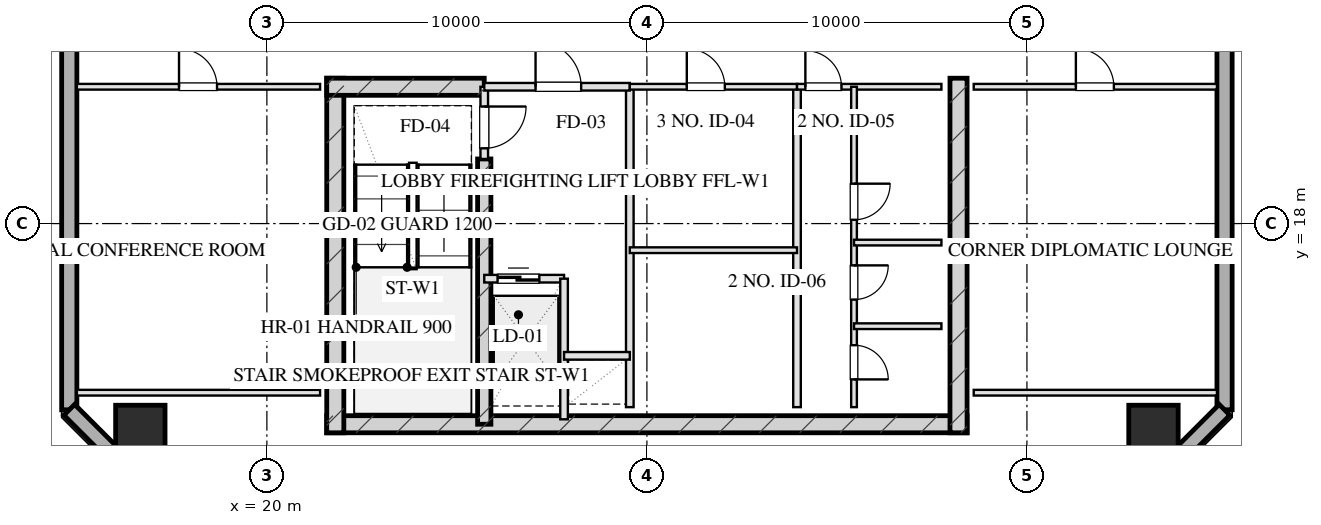
"""IFC4 building model, lengths in metres.
Left out: names, types, materials, properties, quantities, classifications, styles, units other than length and angle.
Written with IfcOpenShell. Run it as: python <this file> out.ifc"""

import sys

from ifc_helpers import new_model, si_unit, direction, frame, frame_2d, origin, origin_2d, place, context, subcontext, project, spatial, rectangle, hollow_rectangle, extrude, element, fill, save


model = new_model("IFC4")
c1 = context("Model", 3, precision=1e-05, world=origin(), true_north=direction((0.0, 1.0)))
c2 = subcontext(c1, "Body", "Model", "MODEL_VIEW")
j1 = project(units=[si_unit("LENGTHUNIT", "METRE"), si_unit("PLANEANGLEUNIT", "RADIAN")], contexts=[c1])
p1 = place(None, origin())
s1 = spatial("IfcSite", under=j1, at=p1, CompositionType="ELEMENT")
p2 = place(p1, origin())
s2 = spatial("IfcBuilding", under=s1, at=p2, CompositionType="ELEMENT")
p3 = place(p2, frame((0.0, 0.0, 234.4)))
s3 = spatial("IfcBuildingStorey", under=s2, at=p3, CompositionType="ELEMENT", Elevation=234.4)
p4 = place(p3, frame((21.575, 12.72, 0.0), z_axis=(0.0, 0.0, 1.0), x_axis=(1.0, 0.0, 0.0)))
e1 = element("IfcWall", 1, at=p4, inside=s3, PredefinedType="SHEAR", context=c2, shape_type="SweptSolid", body=[
    extrude(rectangle(XDim=16.85, YDim=0.45, at=frame_2d((8.425, 0.0))), origin(), (0.0, 0.0, 1.0), 3.2),
])
for number, where, z_axis, x_axis in (
    (2, (21.8, 21.825, 0.0), (0.0, 0.0, 1.0), (0.0, -1.0, 0.0)),
    (3, (38.2, 21.825, 0.0), (0.0, 0.0, 1.0), (0.0, -1.0, 0.0)),
):
    element("IfcWall", number, at=place(p3, frame(where, z_axis=z_axis, x_axis=x_axis)), inside=s3, PredefinedType="SHEAR", context=c2, shape_type="SweptSolid", body=[
        extrude(rectangle(XDim=9.33, YDim=0.45, at=frame_2d((4.665, 0.0))), origin(), (0.0, 0.0, 1.0), 3.2),
    ])
p5 = place(p3, frame((25.72, 19.7, 0.0), z_axis=(0.0, 0.0, 1.0), x_axis=(0.0, -1.0, 0.0)))
e4 = element("IfcWall", 4, at=p5, inside=s3, PredefinedType="SHEAR", context=c2, shape_type="SweptSolid", body=[
    extrude(rectangle(XDim=6.98, YDim=0.35, at=frame_2d((3.49, 0.0))), origin(), (0.0, 0.0, 1.0), 3.2),
])
p6 = place(p3, frame((21.575, 21.6, 0.0), z_axis=(0.0, 0.0, 1.0), x_axis=(1.0, 0.0, 0.0)))
e5 = element("IfcWall", 5, at=p6, inside=s3, PredefinedType="SHEAR", context=c2, shape_type="SweptSolid", body=[
    extrude(rectangle(XDim=4.145, YDim=0.45, at=frame_2d((2.073, 0.0))), origin(), (0.0, 0.0, 1.0), 3.2),
])
for number, where, z_axis, x_axis in (
    (6, (16.67, 12.57, 0.0), (0.0, 0.0, 1.0), (1.0, 0.0, 0.0)),
    (7, (43.33, 12.57, 0.0), (0.0, 0.0, 1.0), (1.0, 0.0, 0.0)),
):
    element("IfcColumn", number, at=place(p3, frame(where, z_axis=z_axis, x_axis=x_axis)), inside=s3, PredefinedType="COLUMN", context=c2, shape_type="SweptSolid", body=[
        extrude(hollow_rectangle(XDim=1.3, YDim=1.3, WallThickness=0.045, at=origin_2d()), origin(), (0.0, 0.0, 1.0), 3.201),
    ])
p7 = place(p3, frame((14.8, 13.1, 0.0), z_axis=(0.0, 0.0, 1.0), x_axis=(0.0, 1.0, 0.0)))
e8 = element("IfcWall", 8, at=p7, inside=s3, PredefinedType="SOLIDWALL", context=c2, shape_type="SweptSolid", body=[
    extrude(rectangle(XDim=41.8, YDim=0.4, at=frame_2d((20.9, 0.0))), origin(), (0.0, 0.0, 1.0), 2.36),
])
p8 = place(p7, frame((13.525, 0.0, 0.75)))
e9 = element("IfcOpeningElement", 9, at=p8, cuts=e8, PredefinedType="OPENING", context=c2, shape_type="SweptSolid", body=[
    extrude(rectangle(XDim=1.95, YDim=1.21, at=frame_2d((0.975, 0.605))), frame((0.0, 0.21, 0.0), z_axis=(0.0, -1.0, 0.0), x_axis=(1.0, 0.0, 0.0)), (0.0, 0.0, 1.0), 0.42),
])
p9 = place(p7, frame((17.325, 0.0, 0.75)))
e10 = element("IfcOpeningElement", 10, at=p9, cuts=e8, PredefinedType="OPENING", context=c2, shape_type="SweptSolid", body=[
    extrude(rectangle(XDim=1.95, YDim=1.21, at=frame_2d((0.975, 0.605))), frame((0.0, 0.21, 0.0), z_axis=(0.0, -1.0, 0.0), x_axis=(1.0, 0.0, 0.0)), (0.0, 0.0, 1.0), 0.42),
])
p10 = place(p7, frame((22.525, 0.0, 0.75)))
e11 = element("IfcOpeningElement", 11, at=p10, cuts=e8, PredefinedType="OPENING", context=c2, shape_type="SweptSolid", body=[
    extrude(rectangle(XDim=1.95, YDim=1.21, at=frame_2d((0.975, 0.605))), frame((0.0, 0.21, 0.0), z_axis=(0.0, -1.0, 0.0), x_axis=(1.0, 0.0, 0.0)), (0.0, 0.0, 1.0), 0.42),
])
p11 = place(p7, frame((26.325, 0.0, 0.75)))
e12 = element("IfcOpeningElement", 12, at=p11, cuts=e8, PredefinedType="OPENING", context=c2, shape_type="SweptSolid", body=[
    extrude(rectangle(XDim=1.95, YDim=1.21, at=frame_2d((0.975, 0.605))), frame((0.0, 0.21, 0.0), z_axis=(0.0, -1.0, 0.0), x_axis=(1.0, 0.0, 0.0)), (0.0, 0.0, 1.0), 0.42),
])
p12 = place(p3, frame((45.2, 54.9, 0.0), z_axis=(0.0, 0.0, 1.0), x_axis=(0.0, -1.0, 0.0)))
e13 = element("IfcWall", 13, at=p12, inside=s3, PredefinedType="SOLIDWALL", context=c2, shape_type="SweptSolid", body=[
    extrude(rectangle(XDim=41.8, YDim=0.4, at=frame_2d((20.9, 0.0))), origin(), (0.0, 0.0, 1.0), 2.36),
])
p13 = place(p12, frame((26.325, 0.0, 0.75)))
e14 = element("IfcOpeningElement", 14, at=p13, cuts=e13, PredefinedType="OPENING", context=c2, shape_type="SweptSolid", body=[
    extrude(rectangle(XDim=1.95, YDim=1.21, at=frame_2d((0.975, 0.605))), frame((0.0, 0.21, 0.0), z_axis=(0.0, -1.0, 0.0), x_axis=(1.0, 0.0, 0.0)), (0.0, 0.0, 1.0), 0.42),
])
p14 = place(p12, frame((22.525, 0.0, 0.75)))
e15 = element("IfcOpeningElement", 15, at=p14, cuts=e13, PredefinedType="OPENING", context=c2, shape_type="SweptSolid", body=[
    extrude(rectangle(XDim=1.95, YDim=1.21, at=frame_2d((0.975, 0.605))), frame((0.0, 0.21, 0.0), z_axis=(0.0, -1.0, 0.0), x_axis=(1.0, 0.0, 0.0)), (0.0, 0.0, 1.0), 0.42),
])
p15 = place(p12, frame((17.325, 0.0, 0.75)))
e16 = element("IfcOpeningElement", 16, at=p15, cuts=e13, PredefinedType="OPENING", context=c2, shape_type="SweptSolid", body=[
    extrude(rectangle(XDim=1.95, YDim=1.21, at=frame_2d((0.975, 0.605))), frame((0.0, 0.21, 0.0), z_axis=(0.0, -1.0, 0.0), x_axis=(1.0, 0.0, 0.0)), (0.0, 0.0, 1.0), 0.42),
])
p16 = place(p12, frame((13.525, 0.0, 0.75)))
e17 = element("IfcOpeningElement", 17, at=p16, cuts=e13, PredefinedType="OPENING", context=c2, shape_type="SweptSolid", body=[
    extrude(rectangle(XDim=1.95, YDim=1.21, at=frame_2d((0.975, 0.605))), frame((0.0, 0.21, 0.0), z_axis=(0.0, -1.0, 0.0), x_axis=(1.0, 0.0, 0.0)), (0.0, 0.0, 1.0), 0.42),
])
for number, where, z_axis, x_axis in (
    (18, (45.2, 13.1, 0.0), (0.0, 0.0, 1.0), (-0.707, -0.707, 0.0)),
    (19, (17.2, 10.7, 0.0), (0.0, 0.0, 1.0), (-0.707, 0.707, 0.0)),
):
    element("IfcWall", number, at=place(p3, frame(where, z_axis=z_axis, x_axis=x_axis)), inside=s3, PredefinedType="SOLIDWALL", context=c2, shape_type="SweptSolid", body=[
        extrude(rectangle(XDim=3.394, YDim=0.4, at=frame_2d((1.697, 0.0))), origin(), (0.0, 0.0, 1.0), 2.36),
    ])
p17 = place(p3, frame((25.72, 21.6, 0.0), z_axis=(0.0, 0.0, 1.0), x_axis=(0.0, -1.0, 0.0)))
e20 = element("IfcWall", 20, at=p17, inside=s3, PredefinedType="PARTITIONING", context=c2, shape_type="SweptSolid", body=[
    extrude(rectangle(XDim=1.9, YDim=0.2, at=frame_2d((0.95, 0.0))), origin(), (0.0, 0.0, 1.0), 2.925),
])
p18 = place(p17, frame((0.52, 0.0, 0.0)))
e21 = element("IfcOpeningElement", 21, at=p18, cuts=e20, PredefinedType="OPENING", context=c2, shape_type="SweptSolid", body=[
    extrude(rectangle(XDim=1.1, YDim=2.05, at=frame_2d((0.55, 1.025))), frame((0.0, 0.11, 0.0), z_axis=(0.0, -1.0, 0.0), x_axis=(1.0, 0.0, 0.0)), (0.0, 0.0, 1.0), 0.22),
])
p19 = place(p3, frame((29.55, 21.6, 0.0), z_axis=(0.0, 0.0, 1.0), x_axis=(0.0, -1.0, 0.0)))
e22 = element("IfcWall", 22, at=p19, inside=s3, PredefinedType="PARTITIONING", context=c2, shape_type="SweptSolid", body=[
    extrude(rectangle(XDim=8.43, YDim=0.2, at=frame_2d((4.215, 0.0))), origin(), (0.0, 0.0, 1.0), 2.925),
])
p20 = place(p3, frame((25.72, 21.6, 0.0), z_axis=(0.0, 0.0, 1.0), x_axis=(1.0, 0.0, 0.0)))
e23 = element("IfcWall", 23, at=p20, inside=s3, PredefinedType="PARTITIONING", context=c2, shape_type="SweptSolid", body=[
    extrude(rectangle(XDim=3.83, YDim=0.2, at=frame_2d((1.915, 0.0))), origin(), (0.0, 0.0, 1.0), 2.925),
])
p21 = place(p20, frame((1.35, 0.0, 0.0)))
e24 = element("IfcOpeningElement", 24, at=p21, cuts=e23, PredefinedType="OPENING", context=c2, shape_type="SweptSolid", body=[
    extrude(rectangle(XDim=1.2, YDim=2.05, at=frame_2d((0.6, 1.025))), frame((0.0, 0.11, 0.0), z_axis=(0.0, -1.0, 0.0), x_axis=(1.0, 0.0, 0.0)), (0.0, 0.0, 1.0), 0.22),
])
p22 = place(p3, frame((25.72, 16.55, 0.0), z_axis=(0.0, 0.0, 1.0), x_axis=(1.0, 0.0, 0.0)))
e25 = element("IfcWall", 25, at=p22, inside=s3, PredefinedType="PARTITIONING", context=c2, shape_type="SweptSolid", body=[
    extrude(rectangle(XDim=2.1, YDim=0.2, at=frame_2d((1.05, 0.0))), origin(), (0.0, 0.0, 1.0), 2.925),
])
p23 = place(p22, frame((0.35, 0.0, 0.0)))
e26 = element("IfcOpeningElement", 26, at=p23, cuts=e25, PredefinedType="OPENING", context=c2, shape_type="SweptSolid", body=[
    extrude(rectangle(XDim=1.1, YDim=2.05, at=frame_2d((0.55, 1.025))), frame((0.0, 0.11, 0.0), z_axis=(0.0, -1.0, 0.0), x_axis=(1.0, 0.0, 0.0)), (0.0, 0.0, 1.0), 0.22),
])
p24 = place(p3, frame((27.82, 16.55, 0.0), z_axis=(0.0, 0.0, 1.0), x_axis=(0.0, -1.0, 0.0)))
e27 = element("IfcWall", 27, at=p24, inside=s3, PredefinedType="PARTITIONING", context=c2, shape_type="SweptSolid", body=[
    extrude(rectangle(XDim=3.7, YDim=0.2, at=frame_2d((1.85, 0.0))), origin(), (0.0, 0.0, 1.0), 2.925),
])
p25 = place(p3, frame((27.82, 14.52, 0.0), z_axis=(0.0, 0.0, 1.0), x_axis=(1.0, 0.0, 0.0)))
e28 = element("IfcWall", 28, at=p25, inside=s3, PredefinedType="PARTITIONING", context=c2, shape_type="SweptSolid", body=[
    extrude(rectangle(XDim=1.73, YDim=0.2, at=frame_2d((0.865, 0.0))), origin(), (0.0, 0.0, 1.0), 2.925),
])
p26 = place(p3, frame((33.95, 21.6, 0.0), z_axis=(0.0, 0.0, 1.0), x_axis=(0.0, -1.0, 0.0)))
e29 = element("IfcWall", 29, at=p26, inside=s3, PredefinedType="PARTITIONING", context=c2, shape_type="SweptSolid", body=[
    extrude(rectangle(XDim=8.43, YDim=0.2, at=frame_2d((4.215, 0.0))), origin(), (0.0, 0.0, 1.0), 2.925),
])
p27 = place(p3, frame((29.55, 21.6, 0.0), z_axis=(0.0, 0.0, 1.0), x_axis=(1.0, 0.0, 0.0)))
e30 = element("IfcWall", 30, at=p27, inside=s3, PredefinedType="PARTITIONING", context=c2, shape_type="SweptSolid", body=[
    extrude(rectangle(XDim=4.4, YDim=0.15, at=frame_2d((2.2, 0.0))), origin(), (0.0, 0.0, 1.0), 2.925),
])
p28 = place(p27, frame((1.5, 0.0, 0.0)))
e31 = element("IfcOpeningElement", 31, at=p28, cuts=e30, PredefinedType="OPENING", context=c2, shape_type="SweptSolid", body=[
    extrude(rectangle(XDim=1.0, YDim=2.05, at=frame_2d((0.5, 1.025))), frame((0.0, 0.085, 0.0), z_axis=(0.0, -1.0, 0.0), x_axis=(1.0, 0.0, 0.0)), (0.0, 0.0, 1.0), 0.17),
])
p29 = place(p3, frame((29.55, 17.3, 0.0), z_axis=(0.0, 0.0, 1.0), x_axis=(1.0, 0.0, 0.0)))
e32 = element("IfcWall", 32, at=p29, inside=s3, PredefinedType="PARTITIONING", context=c2, shape_type="SweptSolid", body=[
    extrude(rectangle(XDim=4.4, YDim=0.15, at=frame_2d((2.2, 0.0))), origin(), (0.0, 0.0, 1.0), 2.925),
])
p30 = place(p3, frame((33.95, 21.6, 0.0), z_axis=(0.0, 0.0, 1.0), x_axis=(1.0, 0.0, 0.0)))
e33 = element("IfcWall", 33, at=p30, inside=s3, PredefinedType="PARTITIONING", context=c2, shape_type="SweptSolid", body=[
    extrude(rectangle(XDim=3.8, YDim=0.15, at=frame_2d((1.9, 0.0))), origin(), (0.0, 0.0, 1.0), 2.925),
])
p31 = place(p30, frame((0.22, 0.0, 0.0)))
e34 = element("IfcOpeningElement", 34, at=p31, cuts=e33, PredefinedType="OPENING", context=c2, shape_type="SweptSolid", body=[
    extrude(rectangle(XDim=0.95, YDim=2.05, at=frame_2d((0.475, 1.025))), frame((0.0, 0.085, 0.0), z_axis=(0.0, -1.0, 0.0), x_axis=(1.0, 0.0, 0.0)), (0.0, 0.0, 1.0), 0.17),
])
p32 = place(p3, frame((35.45, 21.6, 0.0), z_axis=(0.0, 0.0, 1.0), x_axis=(0.0, -1.0, 0.0)))
e35 = element("IfcWall", 35, at=p32, inside=s3, PredefinedType="PARTITIONING", context=c2, shape_type="SweptSolid", body=[
    extrude(rectangle(XDim=8.43, YDim=0.15, at=frame_2d((4.215, 0.0))), origin(), (0.0, 0.0, 1.0), 2.565),
])
p33 = place(p32, frame((2.55, 0.0, 0.0)))
e36 = element("IfcOpeningElement", 36, at=p33, cuts=e35, PredefinedType="OPENING", context=c2, shape_type="SweptSolid", body=[
    extrude(rectangle(XDim=0.95, YDim=2.05, at=frame_2d((0.475, 1.025))), frame((0.0, 0.085, 0.0), z_axis=(0.0, -1.0, 0.0), x_axis=(1.0, 0.0, 0.0)), (0.0, 0.0, 1.0), 0.17),
])
p34 = place(p32, frame((4.7, 0.0, 0.0)))
e37 = element("IfcOpeningElement", 37, at=p34, cuts=e35, PredefinedType="OPENING", context=c2, shape_type="SweptSolid", body=[
    extrude(rectangle(XDim=0.9, YDim=2.05, at=frame_2d((0.45, 1.025))), frame((0.0, 0.085, 0.0), z_axis=(0.0, -1.0, 0.0), x_axis=(1.0, 0.0, 0.0)), (0.0, 0.0, 1.0), 0.17),
])
p35 = place(p32, frame((6.8, 0.0, 0.0)))
e38 = element("IfcOpeningElement", 38, at=p35, cuts=e35, PredefinedType="OPENING", context=c2, shape_type="SweptSolid", body=[
    extrude(rectangle(XDim=0.9, YDim=2.05, at=frame_2d((0.45, 1.025))), frame((0.0, 0.085, 0.0), z_axis=(0.0, -1.0, 0.0), x_axis=(1.0, 0.0, 0.0)), (0.0, 0.0, 1.0), 0.17),
])
for number, where, z_axis, x_axis in (
    (39, (35.45, 17.5, 0.0), (0.0, 0.0, 1.0), (1.0, 0.0, 0.0)),
    (40, (35.45, 15.3, 0.0), (0.0, 0.0, 1.0), (1.0, 0.0, 0.0)),
):
    element("IfcWall", number, at=place(p3, frame(where, z_axis=z_axis, x_axis=x_axis)), inside=s3, PredefinedType="PARTITIONING", context=c2, shape_type="SweptSolid", body=[
        extrude(rectangle(XDim=2.3, YDim=0.15, at=frame_2d((1.15, 0.0))), origin(), (0.0, 0.0, 1.0), 2.925),
    ])
p36 = place(p3, frame((15.0, 13.55, 0.0), z_axis=(0.0, 0.0, 1.0), x_axis=(1.0, 0.0, 0.0)))
e41 = element("IfcWall", 41, at=p36, inside=s3, PredefinedType="PARTITIONING", context=c2, shape_type="SweptSolid", body=[
    extrude(rectangle(XDim=6.4, YDim=0.15, at=frame_2d((3.2, 0.0))), origin(), (0.0, 0.0, 1.0), 2.925),
])
p37 = place(p3, frame((15.0, 21.6, 0.0), z_axis=(0.0, 0.0, 1.0), x_axis=(1.0, 0.0, 0.0)))
e42 = element("IfcWall", 42, at=p37, inside=s3, PredefinedType="PARTITIONING", context=c2, shape_type="SweptSolid", body=[
    extrude(rectangle(XDim=6.4, YDim=0.15, at=frame_2d((3.2, 0.0))), origin(), (0.0, 0.0, 1.0), 2.925),
])
p38 = place(p37, frame((2.688, 0.0, 0.0)))
e43 = element("IfcOpeningElement", 43, at=p38, cuts=e42, PredefinedType="OPENING", context=c2, shape_type="SweptSolid", body=[
    extrude(rectangle(XDim=1.0, YDim=2.05, at=frame_2d((0.5, 1.025))), frame((0.0, 0.085, 0.0), z_axis=(0.0, -1.0, 0.0), x_axis=(1.0, 0.0, 0.0)), (0.0, 0.0, 1.0), 0.17),
])
p39 = place(p3, frame((38.6, 13.55, 0.0), z_axis=(0.0, 0.0, 1.0), x_axis=(1.0, 0.0, 0.0)))
e44 = element("IfcWall", 44, at=p39, inside=s3, PredefinedType="PARTITIONING", context=c2, shape_type="SweptSolid", body=[
    extrude(rectangle(XDim=6.4, YDim=0.15, at=frame_2d((3.2, 0.0))), origin(), (0.0, 0.0, 1.0), 2.925),
])
p40 = place(p3, frame((38.6, 21.6, 0.0), z_axis=(0.0, 0.0, 1.0), x_axis=(1.0, 0.0, 0.0)))
e45 = element("IfcWall", 45, at=p40, inside=s3, PredefinedType="PARTITIONING", context=c2, shape_type="SweptSolid", body=[
    extrude(rectangle(XDim=6.4, YDim=0.15, at=frame_2d((3.2, 0.0))), origin(), (0.0, 0.0, 1.0), 2.925),
])
p41 = place(p40, frame((2.688, 0.0, 0.0)))
e46 = element("IfcOpeningElement", 46, at=p41, cuts=e45, PredefinedType="OPENING", context=c2, shape_type="SweptSolid", body=[
    extrude(rectangle(XDim=1.0, YDim=2.05, at=frame_2d((0.5, 1.025))), frame((0.0, 0.085, 0.0), z_axis=(0.0, -1.0, 0.0), x_axis=(1.0, 0.0, 0.0)), (0.0, 0.0, 1.0), 0.17),
])
p42 = place(p18, origin())
e47 = element("IfcDoor", 47, at=p42, inside=s3, OperationType="SINGLE_SWING_LEFT", PredefinedType="DOOR", context=c2, shape_type="SweptSolid", body=[
    extrude(rectangle(XDim=1.1, YDim=2.05, at=frame_2d((0.55, 1.025))), frame((0.0, 0.025, 0.0), z_axis=(0.0, -1.0, 0.0), x_axis=(1.0, 0.0, 0.0)), (0.0, 0.0, 1.0), 0.05),
])
fill(e21, e47)
p43 = place(p21, origin())
e48 = element("IfcDoor", 48, at=p43, inside=s3, OperationType="SINGLE_SWING_LEFT", PredefinedType="DOOR", context=c2, shape_type="SweptSolid", body=[
    extrude(rectangle(XDim=1.2, YDim=2.05, at=frame_2d((0.6, 1.025))), frame((0.0, 0.025, 0.0), z_axis=(0.0, -1.0, 0.0), x_axis=(1.0, 0.0, 0.0)), (0.0, 0.0, 1.0), 0.05),
])
fill(e24, e48)
p44 = place(p23, origin())
e49 = element("IfcDoor", 49, at=p44, inside=s3, OperationType="DOUBLE_DOOR_SLIDING", PredefinedType="DOOR", context=c2, shape_type="SweptSolid", body=[
    extrude(rectangle(XDim=1.1, YDim=2.05, at=frame_2d((0.55, 1.025))), frame((0.0, 0.025, 0.0), z_axis=(0.0, -1.0, 0.0), x_axis=(1.0, 0.0, 0.0)), (0.0, 0.0, 1.0), 0.05),
])
fill(e26, e49)
p45 = place(p28, origin())
e50 = element("IfcDoor", 50, at=p45, inside=s3, OperationType="SINGLE_SWING_LEFT", PredefinedType="DOOR", context=c2, shape_type="SweptSolid", body=[
    extrude(rectangle(XDim=1.0, YDim=2.05, at=frame_2d((0.5, 1.025))), frame((0.0, 0.025, 0.0), z_axis=(0.0, -1.0, 0.0), x_axis=(1.0, 0.0, 0.0)), (0.0, 0.0, 1.0), 0.05),
])
fill(e31, e50)
p46 = place(p31, origin())
e51 = element("IfcDoor", 51, at=p46, inside=s3, OperationType="SINGLE_SWING_LEFT", PredefinedType="DOOR", context=c2, shape_type="SweptSolid", body=[
    extrude(rectangle(XDim=0.95, YDim=2.05, at=frame_2d((0.475, 1.025))), frame((0.0, 0.025, 0.0), z_axis=(0.0, -1.0, 0.0), x_axis=(1.0, 0.0, 0.0)), (0.0, 0.0, 1.0), 0.05),
])
fill(e34, e51)
p47 = place(p33, origin())
e52 = element("IfcDoor", 52, at=p47, inside=s3, OperationType="SINGLE_SWING_LEFT", PredefinedType="DOOR", context=c2, shape_type="SweptSolid", body=[
    extrude(rectangle(XDim=0.95, YDim=2.05, at=frame_2d((0.475, 1.025))), frame((0.0, 0.025, 0.0), z_axis=(0.0, -1.0, 0.0), x_axis=(1.0, 0.0, 0.0)), (0.0, 0.0, 1.0), 0.05),
])
fill(e36, e52)
p48 = place(p34, origin())
e53 = element("IfcDoor", 53, at=p48, inside=s3, OperationType="SINGLE_SWING_LEFT", PredefinedType="DOOR", context=c2, shape_type="SweptSolid", body=[
    extrude(rectangle(XDim=0.9, YDim=2.05, at=frame_2d((0.45, 1.025))), frame((0.0, 0.025, 0.0), z_axis=(0.0, -1.0, 0.0), x_axis=(1.0, 0.0, 0.0)), (0.0, 0.0, 1.0), 0.05),
])
fill(e37, e53)
p49 = place(p35, origin())
e54 = element("IfcDoor", 54, at=p49, inside=s3, OperationType="SINGLE_SWING_RIGHT", PredefinedType="DOOR", context=c2, shape_type="SweptSolid", body=[
    extrude(rectangle(XDim=0.9, YDim=2.05, at=frame_2d((0.45, 1.025))), frame((0.0, 0.025, 0.0), z_axis=(0.0, -1.0, 0.0), x_axis=(1.0, 0.0, 0.0)), (0.0, 0.0, 1.0), 0.05),
])
fill(e38, e54)
p50 = place(p38, origin())
e55 = element("IfcDoor", 55, at=p50, inside=s3, OperationType="SINGLE_SWING_LEFT", PredefinedType="DOOR", context=c2, shape_type="SweptSolid", body=[
    extrude(rectangle(XDim=1.0, YDim=2.05, at=frame_2d((0.5, 1.025))), frame((0.0, 0.025, 0.0), z_axis=(0.0, -1.0, 0.0), x_axis=(1.0, 0.0, 0.0)), (0.0, 0.0, 1.0), 0.05),
])
fill(e43, e55)
p51 = place(p41, origin())
e56 = element("IfcDoor", 56, at=p51, inside=s3, OperationType="SINGLE_SWING_LEFT", PredefinedType="DOOR", context=c2, shape_type="SweptSolid", body=[
    extrude(rectangle(XDim=1.0, YDim=2.05, at=frame_2d((0.5, 1.025))), frame((0.0, 0.025, 0.0), z_axis=(0.0, -1.0, 0.0), x_axis=(1.0, 0.0, 0.0)), (0.0, 0.0, 1.0), 0.05),
])
fill(e46, e56)
save(model, sys.argv[1])
